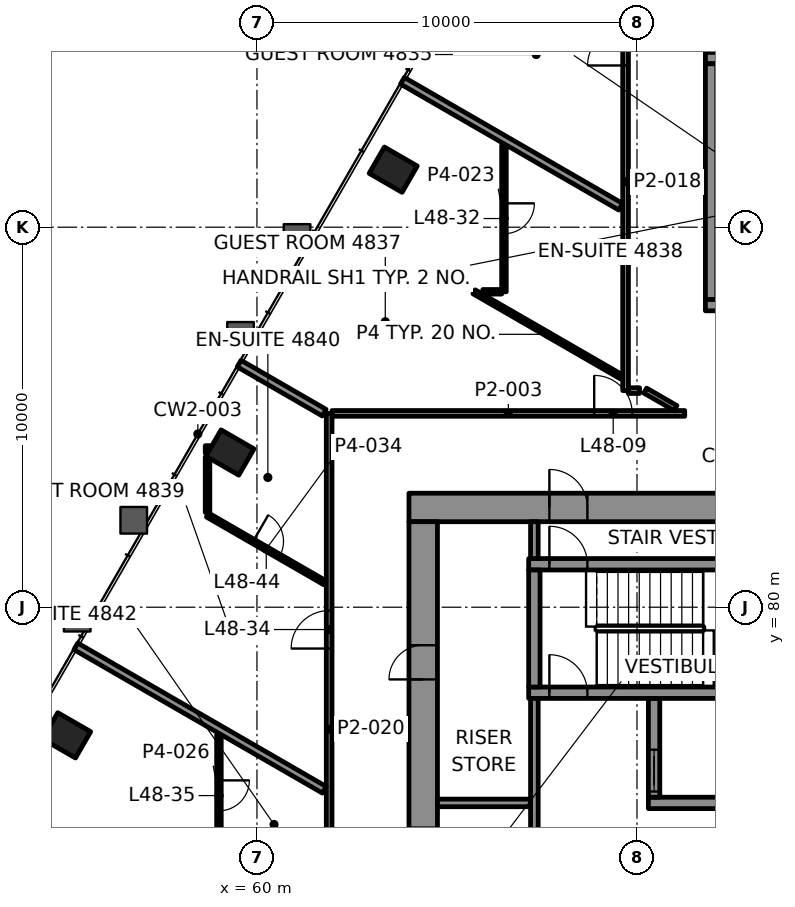
"""IFC4 building model, lengths in metres.
Left out: names, types, materials, properties, quantities, classifications, styles, units other than length and angle.
Written with IfcOpenShell. Run it as: python <this file> out.ifc"""

import sys

from ifc_helpers import new_model, si_unit, direction, frame, frame_2d, origin, origin_2d, place, context, subcontext, project, spatial, rectangle, hollow_rectangle, extrude, element, fill, save


model = new_model("IFC4")
c1 = context("Model", 3, precision=1e-05, world=origin(), true_north=direction((0.0, 1.0)))
c2 = subcontext(c1, "Body", "Model", "MODEL_VIEW")
j1 = project(units=[si_unit("LENGTHUNIT", "METRE"), si_unit("PLANEANGLEUNIT", "RADIAN")], contexts=[c1])
p1 = place(None, origin())
s1 = spatial("IfcSite", under=j1, at=p1, CompositionType="ELEMENT")
p2 = place(p1, origin())
s2 = spatial("IfcBuilding", under=s1, at=p2, CompositionType="ELEMENT")
p3 = place(p2, frame((0.0, 0.0, 206.5)))
s3 = spatial("IfcBuildingStorey", under=s2, at=p3, CompositionType="ELEMENT", Elevation=206.5)
for number, where, z_axis, x_axis in (
    (1, (63.586, 91.513, -0.0), (0.0, 0.0, 1.0), (-0.5, -0.866, 0.0)),
    (2, (59.289, 84.071, -0.0), (0.0, 0.0, 1.0), (-0.5, -0.866, 0.0)),
    (3, (54.992, 76.628, -0.0), (0.0, 0.0, 1.0), (-0.5, -0.866, 0.0)),
):
    element("IfcColumn", number, at=place(p3, frame(where, z_axis=z_axis, x_axis=x_axis)), inside=s3, PredefinedType="COLUMN", context=c2, shape_type="SweptSolid", body=[
        extrude(hollow_rectangle(XDim=0.8, YDim=1.0, WallThickness=0.05, at=origin_2d()), origin(), (0.0, 0.0, 1.0), 3.9),
    ])
p4 = place(p3, frame((64.0, 82.625, 0.0), z_axis=(0.0, 0.0, 1.0), x_axis=(1.0, 0.0, 0.0)))
e4 = element("IfcWall", 4, at=p4, inside=s3, PredefinedType="SHEAR", context=c2, shape_type="SweptSolid", body=[
    extrude(rectangle(XDim=22.0, YDim=0.75, at=frame_2d((11.0, 0.0))), origin(), (0.0, 0.0, 1.0), 3.7),
])
p5 = place(p4, frame((3.695, 0.0, 0.0)))
e5 = element("IfcOpeningElement", 5, at=p5, cuts=e4, PredefinedType="OPENING", context=c2, shape_type="SweptSolid", body=[
    extrude(rectangle(XDim=1.0, YDim=2.1, at=frame_2d((0.5, 1.05))), frame((0.0, 0.385, 0.0), z_axis=(0.0, -1.0, 0.0), x_axis=(1.0, 0.0, 0.0)), (0.0, 0.0, 1.0), 0.77),
])
p6 = place(p4, frame((17.505, 0.0, 0.0)))
e6 = element("IfcOpeningElement", 6, at=p6, cuts=e4, PredefinedType="OPENING", context=c2, shape_type="SweptSolid", body=[
    extrude(rectangle(XDim=1.0, YDim=2.1, at=frame_2d((0.5, 1.05))), frame((0.0, 0.385, 0.0), z_axis=(0.0, -1.0, 0.0), x_axis=(1.0, 0.0, 0.0)), (0.0, 0.0, 1.0), 0.77),
])
p7 = place(p4, frame((10.65, 0.0, 0.0)))
e7 = element("IfcOpeningElement", 7, at=p7, cuts=e4, PredefinedType="OPENING", context=c2, shape_type="SweptSolid", body=[
    extrude(rectangle(XDim=0.9, YDim=2.1, at=frame_2d((0.45, 1.05))), frame((0.0, 0.385, 0.0), z_axis=(0.0, -1.0, 0.0), x_axis=(1.0, 0.0, 0.0)), (0.0, 0.0, 1.0), 0.77),
])
p8 = place(p3, frame((64.375, 67.75, 0.0), z_axis=(0.0, 0.0, 1.0), x_axis=(0.0, 1.0, 0.0)))
e8 = element("IfcWall", 8, at=p8, inside=s3, PredefinedType="SHEAR", context=c2, shape_type="SweptSolid", body=[
    extrude(rectangle(XDim=14.5, YDim=0.75, at=frame_2d((7.25, 0.0))), origin(), (0.0, 0.0, 1.0), 3.7),
])
p9 = place(p8, frame((4.65, 0.0, 0.0)))
e9 = element("IfcOpeningElement", 9, at=p9, cuts=e8, PredefinedType="OPENING", context=c2, shape_type="SweptSolid", body=[
    extrude(rectangle(XDim=1.8, YDim=2.1, at=frame_2d((0.9, 1.05))), frame((0.0, 0.385, 0.0), z_axis=(0.0, -1.0, 0.0), x_axis=(1.0, 0.0, 0.0)), (0.0, 0.0, 1.0), 0.77),
])
p10 = place(p8, frame((2.55, 0.0, 0.0)))
e10 = element("IfcOpeningElement", 10, at=p10, cuts=e8, PredefinedType="OPENING", context=c2, shape_type="SweptSolid", body=[
    extrude(rectangle(XDim=0.9, YDim=2.1, at=frame_2d((0.45, 1.05))), frame((0.0, 0.385, 0.0), z_axis=(0.0, -1.0, 0.0), x_axis=(1.0, 0.0, 0.0)), (0.0, 0.0, 1.0), 0.77),
])
p11 = place(p8, frame((10.35, 0.0, 0.0)))
e11 = element("IfcOpeningElement", 11, at=p11, cuts=e8, PredefinedType="OPENING", context=c2, shape_type="SweptSolid", body=[
    extrude(rectangle(XDim=0.9, YDim=2.1, at=frame_2d((0.45, 1.05))), frame((0.0, 0.385, 0.0), z_axis=(0.0, -1.0, 0.0), x_axis=(1.0, 0.0, 0.0)), (0.0, 0.0, 1.0), 0.77),
])
p12 = place(p3, frame((70.3, 74.85, 0.0), z_axis=(0.0, 0.0, 1.0), x_axis=(1.0, 0.0, 0.0)))
e12 = element("IfcWall", 12, at=p12, inside=s3, PredefinedType="SHEAR", context=c2, shape_type="SweptSolid", body=[
    extrude(rectangle(XDim=14.3, YDim=0.3, at=frame_2d((7.15, 0.0))), origin(), (0.0, 0.0, 1.0), 3.7),
])
p13 = place(p12, frame((3.8, 0.0, 0.0)))
e13 = element("IfcOpeningElement", 13, at=p13, cuts=e12, PredefinedType="OPENING", context=c2, shape_type="SweptSolid", body=[
    extrude(rectangle(XDim=1.1, YDim=2.1, at=frame_2d((0.55, 1.05))), frame((0.0, 0.16, 0.0), z_axis=(0.0, -1.0, 0.0), x_axis=(1.0, 0.0, 0.0)), (0.0, 0.0, 1.0), 0.32),
])
p14 = place(p12, frame((12.2, 0.0, 0.0)))
e14 = element("IfcOpeningElement", 14, at=p14, cuts=e12, PredefinedType="OPENING", context=c2, shape_type="SweptSolid", body=[
    extrude(rectangle(XDim=1.1, YDim=2.1, at=frame_2d((0.55, 1.05))), frame((0.0, 0.16, 0.0), z_axis=(0.0, -1.0, 0.0), x_axis=(1.0, 0.0, 0.0)), (0.0, 0.0, 1.0), 0.32),
])
p15 = place(p3, frame((70.45, 75.0, 0.0), z_axis=(0.0, 0.0, 1.0), x_axis=(0.0, 1.0, 0.0)))
e15 = element("IfcWall", 15, at=p15, inside=s3, PredefinedType="SHEAR", context=c2, shape_type="SweptSolid", body=[
    extrude(rectangle(XDim=2.6, YDim=0.3, at=frame_2d((1.3, 0.0))), origin(), (0.0, 0.0, 1.0), 3.7),
])
p16 = place(p15, frame((0.15, 0.0, 0.0)))
e16 = element("IfcOpeningElement", 16, at=p16, cuts=e15, PredefinedType="OPENING", context=c2, shape_type="SweptSolid", body=[
    extrude(rectangle(XDim=1.1, YDim=2.1, at=frame_2d((0.55, 1.05))), frame((0.0, 0.16, 0.0), z_axis=(0.0, -1.0, 0.0), x_axis=(1.0, 0.0, 0.0)), (0.0, 0.0, 1.0), 0.32),
])
p17 = place(p3, frame((67.15, 77.75, 0.0), z_axis=(0.0, 0.0, 1.0), x_axis=(1.0, 0.0, 0.0)))
e17 = element("IfcWall", 17, at=p17, inside=s3, PredefinedType="SHEAR", context=c2, shape_type="SweptSolid", body=[
    extrude(rectangle(XDim=17.45, YDim=0.3, at=frame_2d((8.725, 0.0))), origin(), (0.0, 0.0, 1.0), 3.7),
])
p18 = place(p17, frame((0.545, 0.0, 0.0)))
e18 = element("IfcOpeningElement", 18, at=p18, cuts=e17, PredefinedType="OPENING", context=c2, shape_type="SweptSolid", body=[
    extrude(rectangle(XDim=1.0, YDim=2.1, at=frame_2d((0.5, 1.05))), frame((0.0, 0.16, 0.0), z_axis=(0.0, -1.0, 0.0), x_axis=(1.0, 0.0, 0.0)), (0.0, 0.0, 1.0), 0.32),
])
p19 = place(p3, frame((67.15, 81.13, 0.0), z_axis=(0.0, 0.0, 1.0), x_axis=(1.0, 0.0, 0.0)))
e19 = element("IfcWall", 19, at=p19, inside=s3, PredefinedType="SHEAR", context=c2, shape_type="SweptSolid", body=[
    extrude(rectangle(XDim=6.91, YDim=0.3, at=frame_2d((3.455, 0.0))), origin(), (0.0, 0.0, 1.0), 3.7),
])
p20 = place(p19, frame((0.545, 0.0, 0.0)))
e20 = element("IfcOpeningElement", 20, at=p20, cuts=e19, PredefinedType="OPENING", context=c2, shape_type="SweptSolid", body=[
    extrude(rectangle(XDim=1.0, YDim=2.1, at=frame_2d((0.5, 1.05))), frame((0.0, 0.16, 0.0), z_axis=(0.0, -1.0, 0.0), x_axis=(1.0, 0.0, 0.0)), (0.0, 0.0, 1.0), 0.32),
])
p21 = place(p3, frame((67.3, 77.9, 0.0), z_axis=(0.0, 0.0, 1.0), x_axis=(0.0, 1.0, 0.0)))
e21 = element("IfcWall", 21, at=p21, inside=s3, PredefinedType="SHEAR", context=c2, shape_type="SweptSolid", body=[
    extrude(rectangle(XDim=3.08, YDim=0.3, at=frame_2d((1.54, 0.0))), origin(), (0.0, 0.0, 1.0), 3.7),
])
p22 = place(p3, frame((71.8, 87.95, 0.0), z_axis=(0.0, 0.0, 1.0), x_axis=(1.0, 0.0, 0.0)))
e22 = element("IfcWall", 22, at=p22, inside=s3, PredefinedType="SHEAR", context=c2, shape_type="SweptSolid", body=[
    extrude(rectangle(XDim=6.4, YDim=0.3, at=frame_2d((3.2, 0.0))), origin(), (0.0, 0.0, 1.0), 3.7),
])
p23 = place(p22, frame((1.325, 0.0, 0.0)))
e23 = element("IfcOpeningElement", 23, at=p23, cuts=e22, PredefinedType="OPENING", context=c2, shape_type="SweptSolid", body=[
    extrude(rectangle(XDim=1.0, YDim=2.1, at=frame_2d((0.5, 1.05))), frame((0.0, 0.16, 0.0), z_axis=(0.0, -1.0, 0.0), x_axis=(1.0, 0.0, 0.0)), (0.0, 0.0, 1.0), 0.32),
])
p24 = place(p22, frame((4.125, 0.0, 0.0)))
e24 = element("IfcOpeningElement", 24, at=p24, cuts=e22, PredefinedType="OPENING", context=c2, shape_type="SweptSolid", body=[
    extrude(rectangle(XDim=1.2, YDim=2.1, at=frame_2d((0.6, 1.05))), frame((0.0, 0.16, 0.0), z_axis=(0.0, -1.0, 0.0), x_axis=(1.0, 0.0, 0.0)), (0.0, 0.0, 1.0), 0.32),
])
p25 = place(p3, frame((71.8, 94.45, 0.0), z_axis=(0.0, 0.0, 1.0), x_axis=(1.0, 0.0, 0.0)))
e25 = element("IfcWall", 25, at=p25, inside=s3, PredefinedType="SHEAR", context=c2, shape_type="SweptSolid", body=[
    extrude(rectangle(XDim=6.4, YDim=0.3, at=frame_2d((3.2, 0.0))), origin(), (0.0, 0.0, 1.0), 3.7),
])
p26 = place(p3, frame((71.95, 88.1, 0.0), z_axis=(0.0, 0.0, 1.0), x_axis=(0.0, 1.0, 0.0)))
e26 = element("IfcWall", 26, at=p26, inside=s3, PredefinedType="SHEAR", context=c2, shape_type="SweptSolid", body=[
    extrude(rectangle(XDim=6.2, YDim=0.3, at=frame_2d((3.1, 0.0))), origin(), (0.0, 0.0, 1.0), 3.7),
])
p27 = place(p3, frame((61.976, 85.1, 0.0), z_axis=(0.0, 0.0, 1.0), x_axis=(1.0, 0.0, 0.0)))
e27 = element("IfcWall", 27, at=p27, inside=s3, PredefinedType="PARTITIONING", context=c2, shape_type="SweptSolid", body=[
    extrude(rectangle(XDim=9.281, YDim=0.15, at=frame_2d((4.64, 0.0))), origin(), (0.0, 0.0, 1.0), 3.097),
])
p28 = place(p27, frame((6.899, 0.0, 0.0)))
e28 = element("IfcOpeningElement", 28, at=p28, cuts=e27, PredefinedType="OPENING", context=c2, shape_type="SweptSolid", body=[
    extrude(rectangle(XDim=1.0, YDim=2.1, at=frame_2d((0.5, 1.05))), frame((0.0, 0.085, 0.0), z_axis=(0.0, -1.0, 0.0), x_axis=(1.0, 0.0, 0.0)), (0.0, 0.0, 1.0), 0.17),
])
p29 = place(p3, frame((69.775, 85.7, 0.0), z_axis=(0.0, 0.0, 1.0), x_axis=(1.0, 0.0, 0.0)))
e29 = element("IfcWall", 29, at=p29, inside=s3, PredefinedType="PARTITIONING", context=c2, shape_type="SweptSolid", body=[
    extrude(rectangle(XDim=0.292, YDim=0.15, at=frame_2d((0.146, 0.0))), origin(), (0.0, 0.0, 1.0), 3.097),
])
p30 = place(p3, frame((65.944, 88.3, 0.0), z_axis=(0.0, 0.0, 1.0), x_axis=(1.0, 0.0, 0.0)))
e30 = element("IfcWall", 30, at=p30, inside=s3, PredefinedType="PARTITIONING", context=c2, shape_type="SweptSolid", body=[
    extrude(rectangle(XDim=0.496, YDim=0.12, at=frame_2d((0.248, 0.0))), origin(), (0.0, 0.0, 1.0), 3.097),
])
p31 = place(p3, frame((69.7, 85.7, 0.0), z_axis=(0.0, 0.0, 1.0), x_axis=(0.0, 1.0, 0.0)))
e31 = element("IfcWall", 31, at=p31, inside=s3, PredefinedType="PARTITIONING", context=c2, shape_type="SweptSolid", body=[
    extrude(rectangle(XDim=10.999, YDim=0.15, at=frame_2d((5.5, 0.0))), origin(), (0.0, 0.0, 1.0), 3.097),
])
p32 = place(p31, frame((8.555, 0.0, 0.0)))
e32 = element("IfcOpeningElement", 32, at=p32, cuts=e31, PredefinedType="OPENING", context=c2, shape_type="SweptSolid", body=[
    extrude(rectangle(XDim=1.0, YDim=2.1, at=frame_2d((0.5, 1.05))), frame((0.0, 0.085, 0.0), z_axis=(0.0, -1.0, 0.0), x_axis=(1.0, 0.0, 0.0)), (0.0, 0.0, 1.0), 0.17),
])
p33 = place(p3, frame((66.5, 92.156, 0.0), z_axis=(0.0, 0.0, 1.0), x_axis=(0.0, -1.0, 0.0)))
e33 = element("IfcWall", 33, at=p33, inside=s3, PredefinedType="PARTITIONING", context=c2, shape_type="SweptSolid", body=[
    extrude(rectangle(XDim=3.856, YDim=0.12, at=frame_2d((1.928, 0.0))), origin(), (0.0, 0.0, 1.0), 3.1),
])
p34 = place(p33, frame((1.528, 0.0, 0.0)))
e34 = element("IfcOpeningElement", 34, at=p34, cuts=e33, PredefinedType="OPENING", context=c2, shape_type="SweptSolid", body=[
    extrude(rectangle(XDim=0.8, YDim=2.1, at=frame_2d((0.4, 1.05))), frame((0.0, 0.07, 0.0), z_axis=(0.0, -1.0, 0.0), x_axis=(1.0, 0.0, 0.0)), (0.0, 0.0, 1.0), 0.14),
])
p35 = place(p3, frame((61.9, 68.476, 0.0), z_axis=(0.0, 0.0, 1.0), x_axis=(0.0, 1.0, 0.0)))
e35 = element("IfcWall", 35, at=p35, inside=s3, PredefinedType="PARTITIONING", context=c2, shape_type="SweptSolid", body=[
    extrude(rectangle(XDim=16.624, YDim=0.15, at=frame_2d((8.312, 0.0))), origin(), (0.0, 0.0, 1.0), 3.1),
])
p36 = place(p35, frame((1.984, 0.0, 0.0)))
e36 = element("IfcOpeningElement", 36, at=p36, cuts=e35, PredefinedType="OPENING", context=c2, shape_type="SweptSolid", body=[
    extrude(rectangle(XDim=1.0, YDim=2.1, at=frame_2d((0.5, 1.05))), frame((0.0, 0.085, 0.0), z_axis=(0.0, -1.0, 0.0), x_axis=(1.0, 0.0, 0.0)), (0.0, 0.0, 1.0), 0.17),
])
p37 = place(p35, frame((10.437, 0.0, 0.0)))
e37 = element("IfcOpeningElement", 37, at=p37, cuts=e35, PredefinedType="OPENING", context=c2, shape_type="SweptSolid", body=[
    extrude(rectangle(XDim=1.0, YDim=2.1, at=frame_2d((0.5, 1.05))), frame((0.0, 0.085, 0.0), z_axis=(0.0, -1.0, 0.0), x_axis=(1.0, 0.0, 0.0)), (0.0, 0.0, 1.0), 0.17),
])
p38 = place(p3, frame((59.0, 76.64, 0.0), z_axis=(0.0, 0.0, 1.0), x_axis=(0.0, -1.0, 0.0)))
e38 = element("IfcWall", 38, at=p38, inside=s3, PredefinedType="PARTITIONING", context=c2, shape_type="SweptSolid", body=[
    extrude(rectangle(XDim=3.194, YDim=0.12, at=frame_2d((1.597, 0.0))), origin(), (0.0, 0.0, 1.0), 3.1),
])
p39 = place(p38, frame((1.197, 0.0, 0.0)))
e39 = element("IfcOpeningElement", 39, at=p39, cuts=e38, PredefinedType="OPENING", context=c2, shape_type="SweptSolid", body=[
    extrude(rectangle(XDim=0.8, YDim=2.1, at=frame_2d((0.4, 1.05))), frame((0.0, 0.07, 0.0), z_axis=(0.0, -1.0, 0.0), x_axis=(1.0, 0.0, 0.0)), (0.0, 0.0, 1.0), 0.14),
])
p40 = place(p3, frame((58.7, 82.495, 0.0), z_axis=(0.0, 0.0, 1.0), x_axis=(0.0, 1.0, 0.0)))
e40 = element("IfcWall", 40, at=p40, inside=s3, PredefinedType="PARTITIONING", context=c2, shape_type="SweptSolid", body=[
    extrude(rectangle(XDim=1.453, YDim=0.12, at=frame_2d((0.727, 0.0))), origin(), (0.0, 0.0, 1.0), 3.022),
])
p41 = place(p3, frame((58.7, 84.051, 0.0), z_axis=(0.0, 0.0, 1.0), x_axis=(0.0, 1.0, 0.0)))
e41 = element("IfcWall", 41, at=p41, inside=s3, PredefinedType="PARTITIONING", context=c2, shape_type="SweptSolid", body=[
    extrude(rectangle(XDim=0.2, YDim=0.12, at=frame_2d((0.1, 0.0))), origin(), (0.0, 0.0, 1.0), 3.1),
])
p42 = place(p3, frame((69.573, 90.537, 0.0), z_axis=(0.0, 0.0, 1.0), x_axis=(-0.866026229868, 0.499998569178, 0.0)))
e42 = element("IfcWall", 42, at=p42, inside=s3, PredefinedType="PARTITIONING", context=c2, shape_type="SweptSolid", body=[
    extrude(rectangle(XDim=6.633, YDim=0.2, at=frame_2d((3.317, 0.0))), origin(), (0.0, 0.0, 1.0), 3.022),
])
p43 = place(p3, frame((71.014, 85.24, 0.0), z_axis=(0.0, 0.0, 1.0), x_axis=(-0.865964657013, 0.500105201737, 0.0)))
e43 = element("IfcWall", 43, at=p43, inside=s3, PredefinedType="PARTITIONING", context=c2, shape_type="SweptSolid", body=[
    extrude(rectangle(XDim=0.92, YDim=0.15, at=frame_2d((0.46, 0.0))), origin(), (0.0, 0.0, 1.0), 3.097),
])
p44 = place(p3, frame((69.59, 86.062, 0.0), z_axis=(0.0, 0.0, 1.0), x_axis=(-0.866029361473, 0.49999314502, 0.0)))
e44 = element("IfcWall", 44, at=p44, inside=s3, PredefinedType="PARTITIONING", context=c2, shape_type="SweptSolid", body=[
    extrude(rectangle(XDim=4.476, YDim=0.12, at=frame_2d((2.238, 0.0))), origin(), (0.0, 0.0, 1.0), 3.097),
])
p45 = place(p3, frame((61.77, 85.119, 0.0), z_axis=(0.0, 0.0, 1.0), x_axis=(-0.866055039205, 0.499948666432, 0.0)))
e45 = element("IfcWall", 45, at=p45, inside=s3, PredefinedType="PARTITIONING", context=c2, shape_type="SweptSolid", body=[
    extrude(rectangle(XDim=2.585, YDim=0.2, at=frame_2d((1.292, 0.0))), origin(), (0.0, 0.0, 1.0), 3.022),
])
p46 = place(p3, frame((58.7, 82.426, 0.0), z_axis=(0.0, 0.0, 1.0), x_axis=(0.866028357664, -0.499994883695, 0.0)))
e46 = element("IfcWall", 46, at=p46, inside=s3, PredefinedType="PARTITIONING", context=c2, shape_type="SweptSolid", body=[
    extrude(rectangle(XDim=3.568, YDim=0.12, at=frame_2d((1.784, 0.0))), origin(), (0.0, 0.0, 1.0), 3.1),
])
p47 = place(p46, frame((1.384, 0.0, 0.0)))
e47 = element("IfcOpeningElement", 47, at=p47, cuts=e46, PredefinedType="OPENING", context=c2, shape_type="SweptSolid", body=[
    extrude(rectangle(XDim=0.8, YDim=2.1, at=frame_2d((0.4, 1.05))), frame((0.0, 0.07, 0.0), z_axis=(0.0, -1.0, 0.0), x_axis=(1.0, 0.0, 0.0)), (0.0, 0.0, 1.0), 0.14),
])
p48 = place(p3, frame((61.773, 75.195, 0.0), z_axis=(0.0, 0.0, 1.0), x_axis=(-0.866025649656, 0.499999574138, 0.0)))
e48 = element("IfcWall", 48, at=p48, inside=s3, PredefinedType="PARTITIONING", context=c2, shape_type="SweptSolid", body=[
    extrude(rectangle(XDim=7.55, YDim=0.2, at=frame_2d((3.775, 0.0))), origin(), (0.0, 0.0, 1.0), 3.022),
])
p49 = place(p3, frame((64.75, 74.85, 0.0), z_axis=(0.0, 0.0, 1.0), x_axis=(1.0, 0.0, 0.0)))
e49 = element("IfcWall", 49, at=p49, inside=s3, PredefinedType="PARTITIONING", context=c2, shape_type="SweptSolid", body=[
    extrude(rectangle(XDim=2.45, YDim=0.2, at=frame_2d((1.225, 0.0))), origin(), (0.0, 0.0, 1.0), 3.7),
])
p50 = place(p3, frame((67.3, 71.85, 0.0), z_axis=(0.0, 0.0, 1.0), x_axis=(0.0, 1.0, 0.0)))
e50 = element("IfcWall", 50, at=p50, inside=s3, PredefinedType="PARTITIONING", context=c2, shape_type="SweptSolid", body=[
    extrude(rectangle(XDim=5.75, YDim=0.2, at=frame_2d((2.875, 0.0))), origin(), (0.0, 0.0, 1.0), 3.7),
])
p51 = place(p50, frame((0.85, 0.0, 0.0)))
e51 = element("IfcOpeningElement", 51, at=p51, cuts=e50, PredefinedType="OPENING", context=c2, shape_type="SweptSolid", body=[
    extrude(rectangle(XDim=1.2, YDim=2.1, at=frame_2d((0.6, 1.05))), frame((0.0, 0.11, 0.0), z_axis=(0.0, -1.0, 0.0), x_axis=(1.0, 0.0, 0.0)), (0.0, 0.0, 1.0), 0.22),
])
p52 = place(p3, frame((67.3, 81.28, 0.0), z_axis=(0.0, 0.0, 1.0), x_axis=(0.0, 1.0, 0.0)))
e52 = element("IfcWall", 52, at=p52, inside=s3, PredefinedType="PARTITIONING", context=c2, shape_type="SweptSolid", body=[
    extrude(rectangle(XDim=0.97, YDim=0.2, at=frame_2d((0.485, 0.0))), origin(), (0.0, 0.0, 1.0), 3.7),
])
p53 = place(p28, origin())
e53 = element("IfcDoor", 53, at=p53, inside=s3, OperationType="SINGLE_SWING_RIGHT", PredefinedType="DOOR", context=c2, shape_type="SweptSolid", body=[
    extrude(rectangle(XDim=1.0, YDim=2.1, at=frame_2d((0.5, 1.05))), frame((0.0, 0.025, 0.0), z_axis=(0.0, -1.0, 0.0), x_axis=(1.0, 0.0, 0.0)), (0.0, 0.0, 1.0), 0.05),
])
fill(e28, e53)
p54 = place(p32, origin())
e54 = element("IfcDoor", 54, at=p54, inside=s3, OperationType="SINGLE_SWING_RIGHT", PredefinedType="DOOR", context=c2, shape_type="SweptSolid", body=[
    extrude(rectangle(XDim=1.0, YDim=2.1, at=frame_2d((0.5, 1.05))), frame((0.0, 0.025, 0.0), z_axis=(0.0, -1.0, 0.0), x_axis=(1.0, 0.0, 0.0)), (0.0, 0.0, 1.0), 0.05),
])
fill(e32, e54)
p55 = place(p34, origin())
e55 = element("IfcDoor", 55, at=p55, inside=s3, OperationType="SINGLE_SWING_RIGHT", PredefinedType="DOOR", context=c2, shape_type="SweptSolid", body=[
    extrude(rectangle(XDim=0.8, YDim=2.1, at=frame_2d((0.4, 1.05))), frame((0.0, 0.025, 0.0), z_axis=(0.0, -1.0, 0.0), x_axis=(1.0, 0.0, 0.0)), (0.0, 0.0, 1.0), 0.05),
])
fill(e34, e55)
p56 = place(p37, origin())
e56 = element("IfcDoor", 56, at=p56, inside=s3, OperationType="SINGLE_SWING_RIGHT", PredefinedType="DOOR", context=c2, shape_type="SweptSolid", body=[
    extrude(rectangle(XDim=1.0, YDim=2.1, at=frame_2d((0.5, 1.05))), frame((0.0, 0.025, 0.0), z_axis=(0.0, -1.0, 0.0), x_axis=(1.0, 0.0, 0.0)), (0.0, 0.0, 1.0), 0.05),
])
fill(e37, e56)
p57 = place(p39, origin())
e57 = element("IfcDoor", 57, at=p57, inside=s3, OperationType="SINGLE_SWING_RIGHT", PredefinedType="DOOR", context=c2, shape_type="SweptSolid", body=[
    extrude(rectangle(XDim=0.8, YDim=2.1, at=frame_2d((0.4, 1.05))), frame((0.0, 0.025, 0.0), z_axis=(0.0, -1.0, 0.0), x_axis=(1.0, 0.0, 0.0)), (0.0, 0.0, 1.0), 0.05),
])
fill(e39, e57)
p58 = place(p47, origin())
e58 = element("IfcDoor", 58, at=p58, inside=s3, OperationType="SINGLE_SWING_RIGHT", PredefinedType="DOOR", context=c2, shape_type="SweptSolid", body=[
    extrude(rectangle(XDim=0.8, YDim=2.1, at=frame_2d((0.4, 1.05))), frame((0.0, 0.025, 0.0), z_axis=(0.0, -1.0, 0.0), x_axis=(1.0, 0.0, 0.0)), (0.0, 0.0, 1.0), 0.05),
])
fill(e47, e58)
p59 = place(p16, origin())
e59 = element("IfcDoor", 59, at=p59, inside=s3, OperationType="DOUBLE_DOOR_SLIDING", PredefinedType="DOOR", context=c2, shape_type="SweptSolid", body=[
    extrude(rectangle(XDim=1.1, YDim=2.1, at=frame_2d((0.55, 1.05))), frame((0.0, 0.025, 0.0), z_axis=(0.0, -1.0, 0.0), x_axis=(1.0, 0.0, 0.0)), (0.0, 0.0, 1.0), 0.05),
])
fill(e16, e59)
p60 = place(p18, origin())
e60 = element("IfcDoor", 60, at=p60, inside=s3, OperationType="SINGLE_SWING_LEFT", PredefinedType="DOOR", context=c2, shape_type="SweptSolid", body=[
    extrude(rectangle(XDim=1.0, YDim=2.1, at=frame_2d((0.5, 1.05))), frame((0.0, 0.025, 0.0), z_axis=(0.0, -1.0, 0.0), x_axis=(1.0, 0.0, 0.0)), (0.0, 0.0, 1.0), 0.05),
])
fill(e18, e60)
p61 = place(p20, origin())
e61 = element("IfcDoor", 61, at=p61, inside=s3, OperationType="SINGLE_SWING_RIGHT", PredefinedType="DOOR", context=c2, shape_type="SweptSolid", body=[
    extrude(rectangle(XDim=1.0, YDim=2.1, at=frame_2d((0.5, 1.05))), frame((0.0, 0.025, 0.0), z_axis=(0.0, -1.0, 0.0), x_axis=(1.0, 0.0, 0.0)), (0.0, 0.0, 1.0), 0.05),
])
fill(e20, e61)
p62 = place(p5, origin())
e62 = element("IfcDoor", 62, at=p62, inside=s3, OperationType="SINGLE_SWING_LEFT", PredefinedType="DOOR", context=c2, shape_type="SweptSolid", body=[
    extrude(rectangle(XDim=1.0, YDim=2.1, at=frame_2d((0.5, 1.05))), frame((0.0, 0.095, 0.0), z_axis=(0.0, -1.0, 0.0), x_axis=(1.0, 0.0, 0.0)), (0.0, 0.0, 1.0), 0.19),
])
fill(e5, e62)
p63 = place(p11, origin())
e63 = element("IfcDoor", 63, at=p63, inside=s3, OperationType="SINGLE_SWING_RIGHT", PredefinedType="DOOR", context=c2, shape_type="SweptSolid", body=[
    extrude(rectangle(XDim=0.9, YDim=2.1, at=frame_2d((0.45, 1.05))), frame((0.0, 0.095, 0.0), z_axis=(0.0, -1.0, 0.0), x_axis=(1.0, 0.0, 0.0)), (0.0, 0.0, 1.0), 0.19),
])
fill(e11, e63)
save(model, sys.argv[1])
